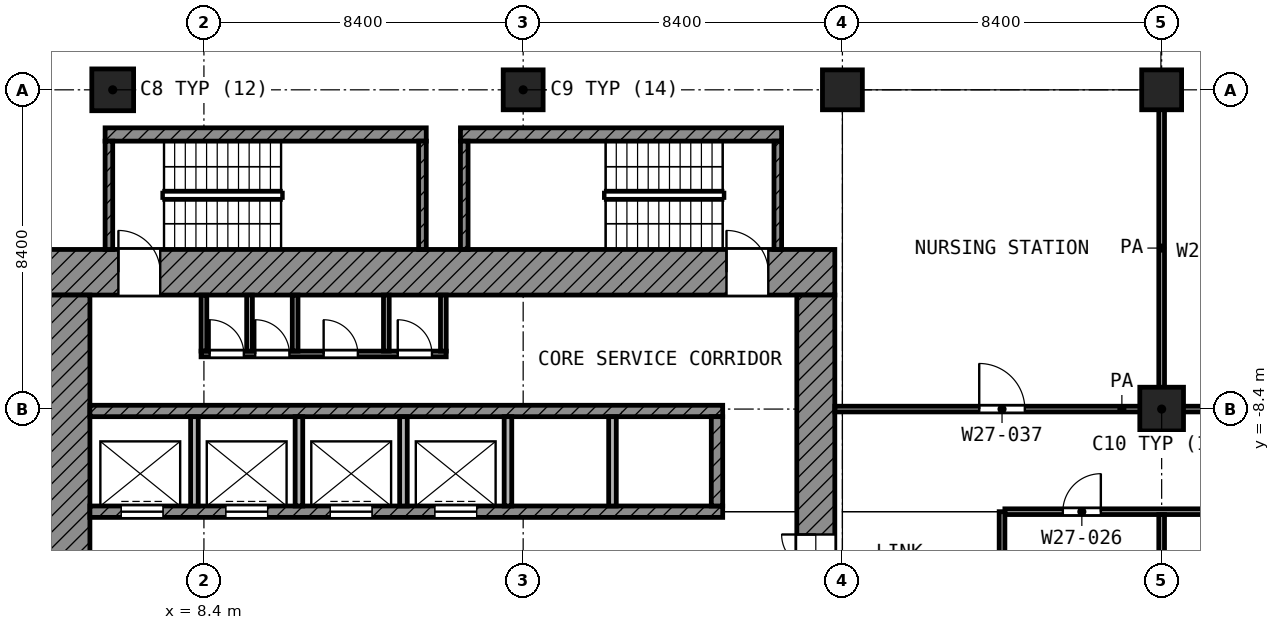
"""IFC4 building model, lengths in metres.
Left out: names, types, materials, properties, quantities, classifications, styles, units other than length and angle.
Written with IfcOpenShell. Run it as: python <this file> out.ifc"""

import sys

from ifc_helpers import new_model, si_unit, direction, frame, frame_2d, origin, origin_2d, place, context, subcontext, project, spatial, rectangle, extrude, element, fill, save


model = new_model("IFC4")
c1 = context("Model", 3, precision=1e-05, world=origin(), true_north=direction((0.0, 1.0)))
c2 = subcontext(c1, "Body", "Model", "MODEL_VIEW")
j1 = project(units=[si_unit("LENGTHUNIT", "METRE"), si_unit("PLANEANGLEUNIT", "RADIAN")], contexts=[c1])
p1 = place(None, origin())
s1 = spatial("IfcSite", under=j1, at=p1, CompositionType="ELEMENT")
p2 = place(p1, origin())
s2 = spatial("IfcBuilding", under=s1, at=p2, CompositionType="ELEMENT")
p3 = place(p2, frame((0.0, 0.0, 140.8)))
s3 = spatial("IfcBuildingStorey", under=s2, at=p3, CompositionType="ELEMENT", Elevation=140.8)
p4 = place(p3, frame((6.0, 0.0, 0.0), z_axis=(0.0, 0.0, 1.0), x_axis=(1.0, 0.0, 0.0)))
e1 = element("IfcColumn", 1, at=p4, inside=s3, PredefinedType="COLUMN", context=c2, shape_type="SweptSolid", body=[
    extrude(rectangle(XDim=1.1, YDim=1.1, at=origin_2d()), origin(), (0.0, 0.0, 1.0), 4.2),
])
for number, where, z_axis, x_axis in (
    (2, (16.8, 0.0, 0.0), (0.0, 0.0, 1.0), (1.0, 0.0, 0.0)),
    (3, (25.2, 0.0, 0.0), (0.0, 0.0, 1.0), (1.0, 0.0, 0.0)),
    (4, (33.6, 0.0, 0.0), (0.0, 0.0, 1.0), (1.0, 0.0, 0.0)),
):
    element("IfcColumn", number, at=place(p3, frame(where, z_axis=z_axis, x_axis=x_axis)), inside=s3, PredefinedType="COLUMN", context=c2, shape_type="SweptSolid", body=[
        extrude(rectangle(XDim=1.05, YDim=1.05, at=origin_2d()), origin(), (0.0, 0.0, 1.0), 4.2),
    ])
p5 = place(p3, frame((33.6, -8.4, 0.0), z_axis=(0.0, 0.0, 1.0), x_axis=(1.0, 0.0, 0.0)))
e5 = element("IfcColumn", 5, at=p5, inside=s3, PredefinedType="COLUMN", context=c2, shape_type="SweptSolid", body=[
    extrude(rectangle(XDim=1.15, YDim=1.15, at=origin_2d()), origin(), (0.0, 0.0, 1.0), 4.2),
])
p6 = place(p3, frame((4.2, -4.8, 0.0), z_axis=(0.0, 0.0, 1.0), x_axis=(1.0, 0.0, 0.0)))
e6 = element("IfcWall", 6, at=p6, inside=s3, PredefinedType="SHEAR", context=c2, shape_type="SweptSolid", body=[
    extrude(rectangle(XDim=20.8, YDim=1.2, at=frame_2d((10.4, 0.0))), origin(), (0.0, 0.0, 1.0), 3.6),
])
p7 = place(p6, frame((1.95, 0.0, 0.0)))
e7 = element("IfcOpeningElement", 7, at=p7, cuts=e6, PredefinedType="OPENING", context=c2, shape_type="SweptSolid", body=[
    extrude(rectangle(XDim=1.1, YDim=2.1, at=frame_2d((0.55, 1.05))), frame((0.0, 0.61, 0.0), z_axis=(0.0, -1.0, 0.0), x_axis=(1.0, 0.0, 0.0)), (0.0, 0.0, 1.0), 1.22),
])
p8 = place(p6, frame((17.95, 0.0, 0.0)))
e8 = element("IfcOpeningElement", 8, at=p8, cuts=e6, PredefinedType="OPENING", context=c2, shape_type="SweptSolid", body=[
    extrude(rectangle(XDim=1.1, YDim=2.1, at=frame_2d((0.55, 1.05))), frame((0.0, 0.61, 0.0), z_axis=(0.0, -1.0, 0.0), x_axis=(1.0, 0.0, 0.0)), (0.0, 0.0, 1.0), 1.22),
])
p9 = place(p3, frame((4.8, -25.0, 0.0), z_axis=(0.0, 0.0, 1.0), x_axis=(0.0, 1.0, 0.0)))
e9 = element("IfcWall", 9, at=p9, inside=s3, PredefinedType="SHEAR", context=c2, shape_type="SweptSolid", body=[
    extrude(rectangle(XDim=19.6, YDim=1.2, at=frame_2d((9.8, 0.0))), origin(), (0.0, 0.0, 1.0), 3.6),
])
p10 = place(p9, frame((11.45, 0.0, 0.0)))
e10 = element("IfcOpeningElement", 10, at=p10, cuts=e9, PredefinedType="OPENING", context=c2, shape_type="SweptSolid", body=[
    extrude(rectangle(XDim=1.1, YDim=2.1, at=frame_2d((0.55, 1.05))), frame((0.0, 0.61, 0.0), z_axis=(0.0, -1.0, 0.0), x_axis=(1.0, 0.0, 0.0)), (0.0, 0.0, 1.0), 1.22),
])
p11 = place(p9, frame((2.15, 0.0, 0.0)))
e11 = element("IfcOpeningElement", 11, at=p11, cuts=e9, PredefinedType="OPENING", context=c2, shape_type="SweptSolid", body=[
    extrude(rectangle(XDim=1.1, YDim=2.1, at=frame_2d((0.55, 1.05))), frame((0.0, 0.61, 0.0), z_axis=(0.0, -1.0, 0.0), x_axis=(1.0, 0.0, 0.0)), (0.0, 0.0, 1.0), 1.22),
])
p12 = place(p3, frame((24.5, -24.0, 0.0), z_axis=(0.0, 0.0, 1.0), x_axis=(0.0, 1.0, 0.0)))
e12 = element("IfcWall", 12, at=p12, inside=s3, PredefinedType="SHEAR", context=c2, shape_type="SweptSolid", body=[
    extrude(rectangle(XDim=18.6, YDim=1.0, at=frame_2d((9.3, 0.0))), origin(), (0.0, 0.0, 1.0), 3.6),
])
p13 = place(p12, frame((10.5, 0.0, 0.0)))
e13 = element("IfcOpeningElement", 13, at=p13, cuts=e12, PredefinedType="OPENING", context=c2, shape_type="SweptSolid", body=[
    extrude(rectangle(XDim=1.8, YDim=2.1, at=frame_2d((0.9, 1.05))), frame((0.0, 0.51, 0.0), z_axis=(0.0, -1.0, 0.0), x_axis=(1.0, 0.0, 0.0)), (0.0, 0.0, 1.0), 1.02),
])
p14 = place(p3, frame((5.4, -8.45, 0.0), z_axis=(0.0, 0.0, 1.0), x_axis=(1.0, 0.0, 0.0)))
e14 = element("IfcWall", 14, at=p14, inside=s3, PredefinedType="SHEAR", context=c2, shape_type="SweptSolid", body=[
    extrude(rectangle(XDim=16.65, YDim=0.3, at=frame_2d((8.325, 0.0))), origin(), (0.0, 0.0, 1.0), 3.6),
])
p15 = place(p3, frame((5.4, -11.1, 0.0), z_axis=(0.0, 0.0, 1.0), x_axis=(1.0, 0.0, 0.0)))
e15 = element("IfcWall", 15, at=p15, inside=s3, PredefinedType="SHEAR", context=c2, shape_type="SweptSolid", body=[
    extrude(rectangle(XDim=16.65, YDim=0.3, at=frame_2d((8.325, 0.0))), origin(), (0.0, 0.0, 1.0), 3.6),
])
p16 = place(p15, frame((0.825, 0.0, 0.0)))
e16 = element("IfcOpeningElement", 16, at=p16, cuts=e15, PredefinedType="OPENING", context=c2, shape_type="SweptSolid", body=[
    extrude(rectangle(XDim=1.1, YDim=2.1, at=frame_2d((0.55, 1.05))), frame((0.0, 0.16, 0.0), z_axis=(0.0, -1.0, 0.0), x_axis=(1.0, 0.0, 0.0)), (0.0, 0.0, 1.0), 0.32),
])
p17 = place(p15, frame((3.575, 0.0, 0.0)))
e17 = element("IfcOpeningElement", 17, at=p17, cuts=e15, PredefinedType="OPENING", context=c2, shape_type="SweptSolid", body=[
    extrude(rectangle(XDim=1.1, YDim=2.1, at=frame_2d((0.55, 1.05))), frame((0.0, 0.16, 0.0), z_axis=(0.0, -1.0, 0.0), x_axis=(1.0, 0.0, 0.0)), (0.0, 0.0, 1.0), 0.32),
])
p18 = place(p15, frame((6.325, 0.0, 0.0)))
e18 = element("IfcOpeningElement", 18, at=p18, cuts=e15, PredefinedType="OPENING", context=c2, shape_type="SweptSolid", body=[
    extrude(rectangle(XDim=1.1, YDim=2.1, at=frame_2d((0.55, 1.05))), frame((0.0, 0.16, 0.0), z_axis=(0.0, -1.0, 0.0), x_axis=(1.0, 0.0, 0.0)), (0.0, 0.0, 1.0), 0.32),
])
p19 = place(p15, frame((9.075, 0.0, 0.0)))
e19 = element("IfcOpeningElement", 19, at=p19, cuts=e15, PredefinedType="OPENING", context=c2, shape_type="SweptSolid", body=[
    extrude(rectangle(XDim=1.1, YDim=2.1, at=frame_2d((0.55, 1.05))), frame((0.0, 0.16, 0.0), z_axis=(0.0, -1.0, 0.0), x_axis=(1.0, 0.0, 0.0)), (0.0, 0.0, 1.0), 0.32),
])
p20 = place(p3, frame((21.9, -10.95, 0.0), z_axis=(0.0, 0.0, 1.0), x_axis=(0.0, 1.0, 0.0)))
e20 = element("IfcWall", 20, at=p20, inside=s3, PredefinedType="SHEAR", context=c2, shape_type="SweptSolid", body=[
    extrude(rectangle(XDim=2.35, YDim=0.3, at=frame_2d((1.175, 0.0))), origin(), (0.0, 0.0, 1.0), 3.6),
])
for number, where, z_axis, x_axis in (
    (21, (8.15, -10.95, 0.0), (0.0, 0.0, 1.0), (0.0, 1.0, 0.0)),
    (22, (10.9, -10.95, 0.0), (0.0, 0.0, 1.0), (0.0, 1.0, 0.0)),
    (23, (13.65, -10.95, 0.0), (0.0, 0.0, 1.0), (0.0, 1.0, 0.0)),
    (24, (16.4, -10.95, 0.0), (0.0, 0.0, 1.0), (0.0, 1.0, 0.0)),
    (25, (19.15, -10.95, 0.0), (0.0, 0.0, 1.0), (0.0, 1.0, 0.0)),
):
    element("IfcWall", number, at=place(p3, frame(where, z_axis=z_axis, x_axis=x_axis)), inside=s3, PredefinedType="PARTITIONING", context=c2, shape_type="SweptSolid", body=[
        extrude(rectangle(XDim=2.35, YDim=0.2, at=frame_2d((1.175, 0.0))), origin(), (0.0, 0.0, 1.0), 3.6),
    ])
p21 = place(p3, frame((8.325, -6.95, 0.0), z_axis=(0.0, 0.0, 1.0), x_axis=(1.0, 0.0, 0.0)))
e26 = element("IfcWall", 26, at=p21, inside=s3, PredefinedType="PARTITIONING", context=c2, shape_type="SweptSolid", body=[
    extrude(rectangle(XDim=6.45, YDim=0.15, at=frame_2d((3.225, 0.0))), origin(), (0.0, 0.0, 1.0), 3.6),
])
p22 = place(p21, frame((0.225, 0.0, 0.0)))
e27 = element("IfcOpeningElement", 27, at=p22, cuts=e26, PredefinedType="OPENING", context=c2, shape_type="SweptSolid", body=[
    extrude(rectangle(XDim=0.9, YDim=2.1, at=frame_2d((0.45, 1.05))), frame((0.0, 0.085, 0.0), z_axis=(0.0, -1.0, 0.0), x_axis=(1.0, 0.0, 0.0)), (0.0, 0.0, 1.0), 0.17),
])
p23 = place(p21, frame((1.425, 0.0, 0.0)))
e28 = element("IfcOpeningElement", 28, at=p23, cuts=e26, PredefinedType="OPENING", context=c2, shape_type="SweptSolid", body=[
    extrude(rectangle(XDim=0.9, YDim=2.1, at=frame_2d((0.45, 1.05))), frame((0.0, 0.085, 0.0), z_axis=(0.0, -1.0, 0.0), x_axis=(1.0, 0.0, 0.0)), (0.0, 0.0, 1.0), 0.17),
])
p24 = place(p21, frame((3.225, 0.0, 0.0)))
e29 = element("IfcOpeningElement", 29, at=p24, cuts=e26, PredefinedType="OPENING", context=c2, shape_type="SweptSolid", body=[
    extrude(rectangle(XDim=0.9, YDim=2.1, at=frame_2d((0.45, 1.05))), frame((0.0, 0.085, 0.0), z_axis=(0.0, -1.0, 0.0), x_axis=(1.0, 0.0, 0.0)), (0.0, 0.0, 1.0), 0.17),
])
p25 = place(p21, frame((5.175, 0.0, 0.0)))
e30 = element("IfcOpeningElement", 30, at=p25, cuts=e26, PredefinedType="OPENING", context=c2, shape_type="SweptSolid", body=[
    extrude(rectangle(XDim=0.9, YDim=2.1, at=frame_2d((0.45, 1.05))), frame((0.0, 0.085, 0.0), z_axis=(0.0, -1.0, 0.0), x_axis=(1.0, 0.0, 0.0)), (0.0, 0.0, 1.0), 0.17),
])
for number, where, z_axis, x_axis in (
    (31, (8.4, -6.875, 0.0), (0.0, 0.0, 1.0), (0.0, 1.0, 0.0)),
    (32, (9.6, -6.875, 0.0), (0.0, 0.0, 1.0), (0.0, 1.0, 0.0)),
    (33, (10.8, -6.875, 0.0), (0.0, 0.0, 1.0), (0.0, 1.0, 0.0)),
    (34, (13.2, -6.875, 0.0), (0.0, 0.0, 1.0), (0.0, 1.0, 0.0)),
    (35, (14.7, -6.875, 0.0), (0.0, 0.0, 1.0), (0.0, 1.0, 0.0)),
):
    element("IfcWall", number, at=place(p3, frame(where, z_axis=z_axis, x_axis=x_axis)), inside=s3, PredefinedType="PARTITIONING", context=c2, shape_type="SweptSolid", body=[
        extrude(rectangle(XDim=1.475, YDim=0.15, at=frame_2d((0.738, 0.0))), origin(), (0.0, 0.0, 1.0), 3.6),
    ])
p26 = place(p3, frame((5.8, -1.175, 0.0), z_axis=(0.0, 0.0, 1.0), x_axis=(1.0, 0.0, 0.0)))
e36 = element("IfcWall", 36, at=p26, inside=s3, PredefinedType="SHEAR", context=c2, shape_type="SweptSolid", body=[
    extrude(rectangle(XDim=8.45, YDim=0.35, at=frame_2d((4.225, 0.0))), origin(), (0.0, 0.0, 1.0), 3.6),
])
for number, where, z_axis, x_axis in (
    (37, (5.9, -4.2, 0.0), (0.0, 0.0, 1.0), (0.0, 1.0, 0.0)),
    (38, (14.15, -4.2, 0.0), (0.0, 0.0, 1.0), (0.0, 1.0, 0.0)),
):
    element("IfcWall", number, at=place(p3, frame(where, z_axis=z_axis, x_axis=x_axis)), inside=s3, PredefinedType="SHEAR", context=c2, shape_type="SweptSolid", body=[
        extrude(rectangle(XDim=2.85, YDim=0.2, at=frame_2d((1.425, 0.0))), origin(), (0.0, 0.0, 1.0), 3.6),
    ])
p27 = place(p3, frame((15.15, -1.175, 0.0), z_axis=(0.0, 0.0, 1.0), x_axis=(1.0, 0.0, 0.0)))
e39 = element("IfcWall", 39, at=p27, inside=s3, PredefinedType="SHEAR", context=c2, shape_type="SweptSolid", body=[
    extrude(rectangle(XDim=8.45, YDim=0.35, at=frame_2d((4.225, 0.0))), origin(), (0.0, 0.0, 1.0), 3.6),
])
for number, where, z_axis, x_axis in (
    (40, (15.25, -4.2, 0.0), (0.0, 0.0, 1.0), (0.0, 1.0, 0.0)),
    (41, (23.5, -4.2, 0.0), (0.0, 0.0, 1.0), (0.0, 1.0, 0.0)),
):
    element("IfcWall", number, at=place(p3, frame(where, z_axis=z_axis, x_axis=x_axis)), inside=s3, PredefinedType="SHEAR", context=c2, shape_type="SweptSolid", body=[
        extrude(rectangle(XDim=2.85, YDim=0.2, at=frame_2d((1.425, 0.0))), origin(), (0.0, 0.0, 1.0), 3.6),
    ])
p28 = place(p3, frame((29.475, -11.1, 0.0), z_axis=(0.0, 0.0, 1.0), x_axis=(1.0, 0.0, 0.0)))
e42 = element("IfcWall", 42, at=p28, inside=s3, PredefinedType="PARTITIONING", context=c2, shape_type="SweptSolid", body=[
    extrude(rectangle(XDim=12.725, YDim=0.15, at=frame_2d((6.362, 0.0))), origin(), (0.0, 0.0, 1.0), 3.6),
])
p29 = place(p28, frame((1.525, 0.0, 0.0)))
e43 = element("IfcOpeningElement", 43, at=p29, cuts=e42, PredefinedType="OPENING", context=c2, shape_type="SweptSolid", body=[
    extrude(rectangle(XDim=1.0, YDim=2.1, at=frame_2d((0.5, 1.05))), frame((0.0, 0.085, 0.0), z_axis=(0.0, -1.0, 0.0), x_axis=(1.0, 0.0, 0.0)), (0.0, 0.0, 1.0), 0.17),
])
p30 = place(p28, frame((9.225, 0.0, 0.0)))
e44 = element("IfcOpeningElement", 44, at=p30, cuts=e42, PredefinedType="OPENING", context=c2, shape_type="SweptSolid", body=[
    extrude(rectangle(XDim=0.9, YDim=2.1, at=frame_2d((0.45, 1.05))), frame((0.0, 0.085, 0.0), z_axis=(0.0, -1.0, 0.0), x_axis=(1.0, 0.0, 0.0)), (0.0, 0.0, 1.0), 0.17),
])
p31 = place(p28, frame((11.275, 0.0, 0.0)))
e45 = element("IfcOpeningElement", 45, at=p31, cuts=e42, PredefinedType="OPENING", context=c2, shape_type="SweptSolid", body=[
    extrude(rectangle(XDim=1.0, YDim=2.1, at=frame_2d((0.5, 1.05))), frame((0.0, 0.085, 0.0), z_axis=(0.0, -1.0, 0.0), x_axis=(1.0, 0.0, 0.0)), (0.0, 0.0, 1.0), 0.17),
])
p32 = place(p28, frame((5.875, 0.0, 0.0)))
e46 = element("IfcOpeningElement", 46, at=p32, cuts=e42, PredefinedType="OPENING", context=c2, shape_type="SweptSolid", body=[
    extrude(rectangle(XDim=1.0, YDim=2.1, at=frame_2d((0.5, 1.05))), frame((0.0, 0.085, 0.0), z_axis=(0.0, -1.0, 0.0), x_axis=(1.0, 0.0, 0.0)), (0.0, 0.0, 1.0), 0.17),
])
p33 = place(p3, frame((25.0, -8.4, 0.0), z_axis=(0.0, 0.0, 1.0), x_axis=(1.0, 0.0, 0.0)))
e47 = element("IfcWall", 47, at=p33, inside=s3, PredefinedType="PARTITIONING", context=c2, shape_type="SweptSolid", body=[
    extrude(rectangle(XDim=15.107, YDim=0.15, at=frame_2d((7.553, 0.0))), origin(), (0.0, 0.0, 1.0), 3.6),
])
p34 = place(p33, frame((3.8, 0.0, 0.0)))
e48 = element("IfcOpeningElement", 48, at=p34, cuts=e47, PredefinedType="OPENING", context=c2, shape_type="SweptSolid", body=[
    extrude(rectangle(XDim=1.2, YDim=2.1, at=frame_2d((0.6, 1.05))), frame((0.0, 0.085, 0.0), z_axis=(0.0, -1.0, 0.0), x_axis=(1.0, 0.0, 0.0)), (0.0, 0.0, 1.0), 0.17),
])
p35 = place(p3, frame((29.4, -14.1, 0.0), z_axis=(0.0, 0.0, 1.0), x_axis=(0.0, 1.0, 0.0)))
e49 = element("IfcWall", 49, at=p35, inside=s3, PredefinedType="PARTITIONING", context=c2, shape_type="SweptSolid", body=[
    extrude(rectangle(XDim=3.0, YDim=0.15, at=frame_2d((1.5, 0.0))), origin(), (0.0, 0.0, 1.0), 3.6),
])
p36 = place(p3, frame((33.6, -14.025, 0.0), z_axis=(0.0, 0.0, 1.0), x_axis=(0.0, 1.0, 0.0)))
e50 = element("IfcWall", 50, at=p36, inside=s3, PredefinedType="PARTITIONING", context=c2, shape_type="SweptSolid", body=[
    extrude(rectangle(XDim=2.85, YDim=0.15, at=frame_2d((1.425, 0.0))), origin(), (0.0, 0.0, 1.0), 3.6),
])
p37 = place(p3, frame((33.6, -8.325, 0.0), z_axis=(0.0, 0.0, 1.0), x_axis=(0.0, 1.0, 0.0)))
e51 = element("IfcWall", 51, at=p37, inside=s3, PredefinedType="PARTITIONING", context=c2, shape_type="SweptSolid", body=[
    extrude(rectangle(XDim=8.322, YDim=0.15, at=frame_2d((4.161, 0.0))), origin(), (0.0, 0.0, 1.0), 3.6),
])
p38 = place(p16, origin())
e52 = element("IfcDoor", 52, at=p38, inside=s3, OperationType="DOUBLE_DOOR_SLIDING", PredefinedType="DOOR", context=c2, shape_type="SweptSolid", body=[
    extrude(rectangle(XDim=1.1, YDim=2.1, at=frame_2d((0.55, 1.05))), frame((0.0, 0.025, 0.0), z_axis=(0.0, -1.0, 0.0), x_axis=(1.0, 0.0, 0.0)), (0.0, 0.0, 1.0), 0.05),
])
fill(e16, e52)
p39 = place(p17, origin())
e53 = element("IfcDoor", 53, at=p39, inside=s3, OperationType="DOUBLE_DOOR_SLIDING", PredefinedType="DOOR", context=c2, shape_type="SweptSolid", body=[
    extrude(rectangle(XDim=1.1, YDim=2.1, at=frame_2d((0.55, 1.05))), frame((0.0, 0.025, 0.0), z_axis=(0.0, -1.0, 0.0), x_axis=(1.0, 0.0, 0.0)), (0.0, 0.0, 1.0), 0.05),
])
fill(e17, e53)
p40 = place(p18, origin())
e54 = element("IfcDoor", 54, at=p40, inside=s3, OperationType="DOUBLE_DOOR_SLIDING", PredefinedType="DOOR", context=c2, shape_type="SweptSolid", body=[
    extrude(rectangle(XDim=1.1, YDim=2.1, at=frame_2d((0.55, 1.05))), frame((0.0, 0.025, 0.0), z_axis=(0.0, -1.0, 0.0), x_axis=(1.0, 0.0, 0.0)), (0.0, 0.0, 1.0), 0.05),
])
fill(e18, e54)
p41 = place(p19, origin())
e55 = element("IfcDoor", 55, at=p41, inside=s3, OperationType="DOUBLE_DOOR_SLIDING", PredefinedType="DOOR", context=c2, shape_type="SweptSolid", body=[
    extrude(rectangle(XDim=1.1, YDim=2.1, at=frame_2d((0.55, 1.05))), frame((0.0, 0.025, 0.0), z_axis=(0.0, -1.0, 0.0), x_axis=(1.0, 0.0, 0.0)), (0.0, 0.0, 1.0), 0.05),
])
fill(e19, e55)
p42 = place(p7, origin())
e56 = element("IfcDoor", 56, at=p42, inside=s3, OperationType="SINGLE_SWING_LEFT", PredefinedType="DOOR", context=c2, shape_type="SweptSolid", body=[
    extrude(rectangle(XDim=1.1, YDim=2.1, at=frame_2d((0.55, 1.05))), frame((0.0, 0.025, 0.0), z_axis=(0.0, -1.0, 0.0), x_axis=(1.0, 0.0, 0.0)), (0.0, 0.0, 1.0), 0.05),
])
fill(e7, e56)
p43 = place(p8, origin())
e57 = element("IfcDoor", 57, at=p43, inside=s3, OperationType="SINGLE_SWING_LEFT", PredefinedType="DOOR", context=c2, shape_type="SweptSolid", body=[
    extrude(rectangle(XDim=1.1, YDim=2.1, at=frame_2d((0.55, 1.05))), frame((0.0, 0.025, 0.0), z_axis=(0.0, -1.0, 0.0), x_axis=(1.0, 0.0, 0.0)), (0.0, 0.0, 1.0), 0.05),
])
fill(e8, e57)
p44 = place(p13, origin())
e58 = element("IfcDoor", 58, at=p44, inside=s3, OperationType="DOUBLE_DOOR_SINGLE_SWING", PredefinedType="DOOR", context=c2, shape_type="SweptSolid", body=[
    extrude(rectangle(XDim=1.8, YDim=2.1, at=frame_2d((0.9, 1.05))), frame((0.0, 0.025, 0.0), z_axis=(0.0, -1.0, 0.0), x_axis=(1.0, 0.0, 0.0)), (0.0, 0.0, 1.0), 0.05),
])
fill(e13, e58)
p45 = place(p22, origin())
e59 = element("IfcDoor", 59, at=p45, inside=s3, OperationType="SINGLE_SWING_LEFT", PredefinedType="DOOR", context=c2, shape_type="SweptSolid", body=[
    extrude(rectangle(XDim=0.9, YDim=2.1, at=frame_2d((0.45, 1.05))), frame((0.0, 0.025, 0.0), z_axis=(0.0, -1.0, 0.0), x_axis=(1.0, 0.0, 0.0)), (0.0, 0.0, 1.0), 0.05),
])
fill(e27, e59)
p46 = place(p23, origin())
e60 = element("IfcDoor", 60, at=p46, inside=s3, OperationType="SINGLE_SWING_LEFT", PredefinedType="DOOR", context=c2, shape_type="SweptSolid", body=[
    extrude(rectangle(XDim=0.9, YDim=2.1, at=frame_2d((0.45, 1.05))), frame((0.0, 0.025, 0.0), z_axis=(0.0, -1.0, 0.0), x_axis=(1.0, 0.0, 0.0)), (0.0, 0.0, 1.0), 0.05),
])
fill(e28, e60)
p47 = place(p24, origin())
e61 = element("IfcDoor", 61, at=p47, inside=s3, OperationType="SINGLE_SWING_LEFT", PredefinedType="DOOR", context=c2, shape_type="SweptSolid", body=[
    extrude(rectangle(XDim=0.9, YDim=2.1, at=frame_2d((0.45, 1.05))), frame((0.0, 0.025, 0.0), z_axis=(0.0, -1.0, 0.0), x_axis=(1.0, 0.0, 0.0)), (0.0, 0.0, 1.0), 0.05),
])
fill(e29, e61)
p48 = place(p25, origin())
e62 = element("IfcDoor", 62, at=p48, inside=s3, OperationType="SINGLE_SWING_LEFT", PredefinedType="DOOR", context=c2, shape_type="SweptSolid", body=[
    extrude(rectangle(XDim=0.9, YDim=2.1, at=frame_2d((0.45, 1.05))), frame((0.0, 0.025, 0.0), z_axis=(0.0, -1.0, 0.0), x_axis=(1.0, 0.0, 0.0)), (0.0, 0.0, 1.0), 0.05),
])
fill(e30, e62)
p49 = place(p34, origin())
e63 = element("IfcDoor", 63, at=p49, inside=s3, OperationType="SINGLE_SWING_LEFT", PredefinedType="DOOR", context=c2, shape_type="SweptSolid", body=[
    extrude(rectangle(XDim=1.2, YDim=2.1, at=frame_2d((0.6, 1.05))), frame((0.0, 0.025, 0.0), z_axis=(0.0, -1.0, 0.0), x_axis=(1.0, 0.0, 0.0)), (0.0, 0.0, 1.0), 0.05),
])
fill(e48, e63)
p50 = place(p29, origin())
e64 = element("IfcDoor", 64, at=p50, inside=s3, OperationType="SINGLE_SWING_RIGHT", PredefinedType="DOOR", context=c2, shape_type="SweptSolid", body=[
    extrude(rectangle(XDim=1.0, YDim=2.1, at=frame_2d((0.5, 1.05))), frame((0.0, 0.025, 0.0), z_axis=(0.0, -1.0, 0.0), x_axis=(1.0, 0.0, 0.0)), (0.0, 0.0, 1.0), 0.05),
])
fill(e43, e64)
save(model, sys.argv[1])
